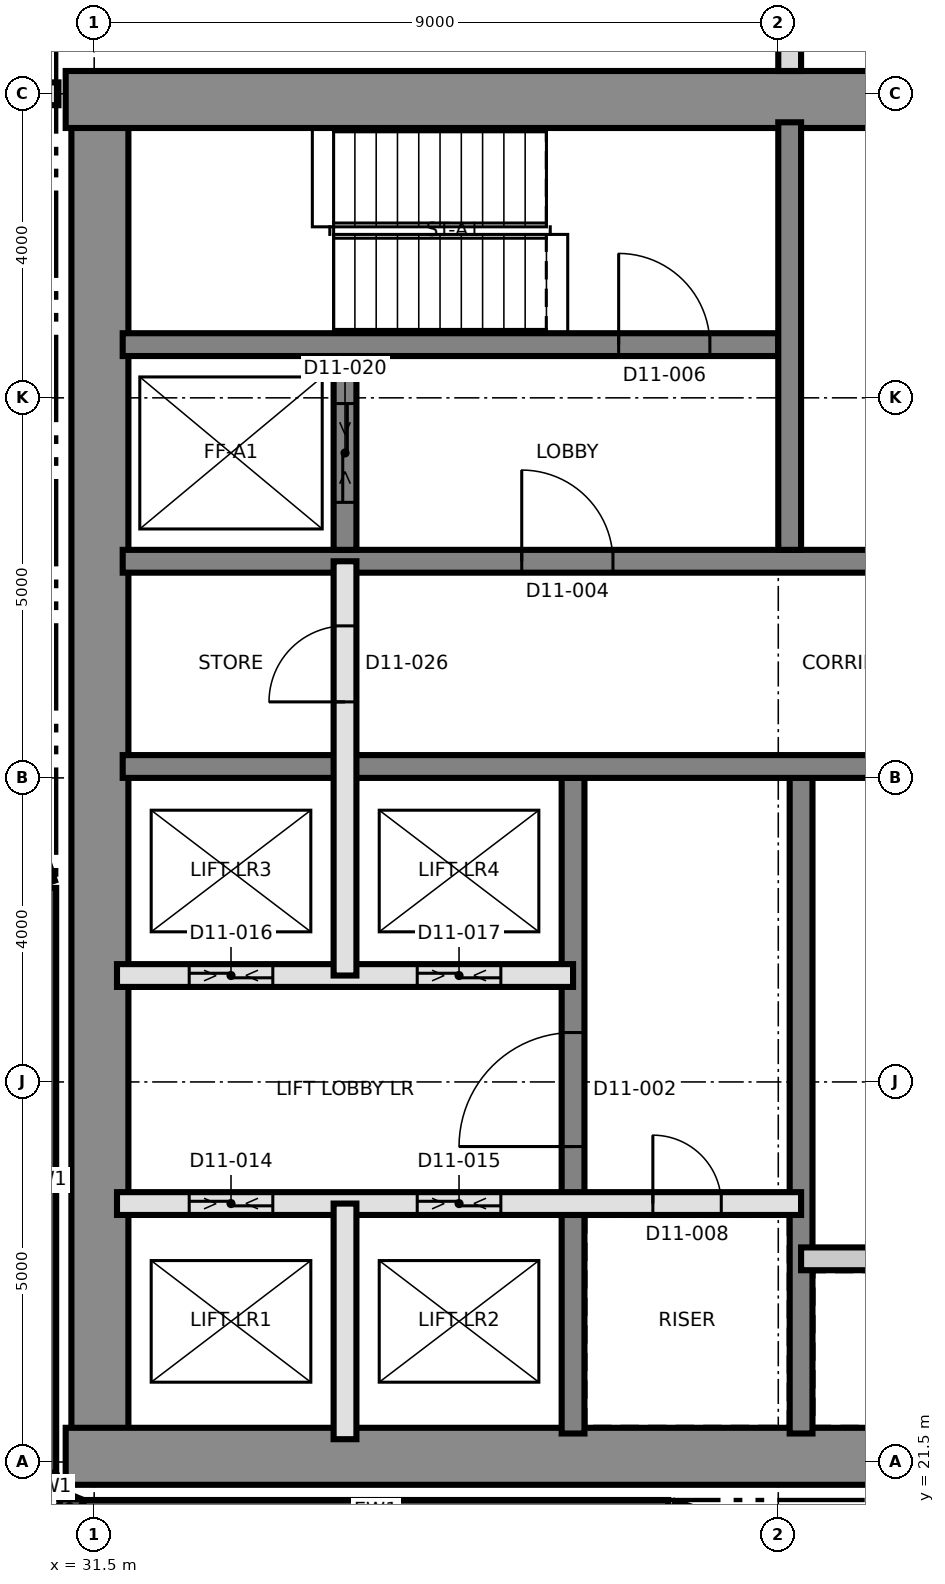
"""IFC4 building model, lengths in metres.
Left out: names, types, materials, properties, quantities, classifications, styles, units other than length and angle.
Written with IfcOpenShell. Run it as: python <this file> out.ifc"""

import sys

from ifc_helpers import new_model, si_unit, direction, frame, frame_2d, origin, place, context, subcontext, project, spatial, rectangle, extrude, element, fill, save


model = new_model("IFC4")
c1 = context("Model", 3, precision=1e-05, world=origin(), true_north=direction((0.0, 1.0)))
c2 = subcontext(c1, "Body", "Model", "MODEL_VIEW")
j1 = project(units=[si_unit("LENGTHUNIT", "METRE"), si_unit("PLANEANGLEUNIT", "RADIAN")], contexts=[c1])
p1 = place(None, origin())
s1 = spatial("IfcSite", under=j1, at=p1, CompositionType="ELEMENT")
p2 = place(p1, origin())
s2 = spatial("IfcBuilding", under=s1, at=p2, CompositionType="ELEMENT")
p3 = place(p2, frame((0.0, 0.0, 127.8)))
s3 = spatial("IfcBuildingStorey", under=s2, at=p3, CompositionType="ELEMENT", Elevation=127.8)
p4 = place(p3, frame((31.575, 21.875, 0.0), z_axis=(0.0, 0.0, 1.0), x_axis=(0.0, 1.0, 0.0)))
e1 = element("IfcWall", 1, at=p4, inside=s3, PredefinedType="SHEAR", context=c2, shape_type="SweptSolid", body=[
    extrude(rectangle(XDim=17.25, YDim=0.75, at=frame_2d((8.625, 0.0))), origin(), (0.0, 0.0, 1.0), 3.7),
])
p5 = place(p3, frame((31.125, 21.575, 0.0), z_axis=(0.0, 0.0, 1.0), x_axis=(1.0, 0.0, 0.0)))
e2 = element("IfcWall", 2, at=p5, inside=s3, PredefinedType="SHEAR", context=c2, shape_type="SweptSolid", body=[
    extrude(rectangle(XDim=27.0, YDim=0.75, at=frame_2d((13.5, 0.0))), origin(), (0.0, 0.0, 1.0), 3.7),
])
p6 = place(p3, frame((31.125, 39.425, 0.0), z_axis=(0.0, 0.0, 1.0), x_axis=(1.0, 0.0, 0.0)))
e3 = element("IfcWall", 3, at=p6, inside=s3, PredefinedType="SHEAR", context=c2, shape_type="SweptSolid", body=[
    extrude(rectangle(XDim=27.0, YDim=0.75, at=frame_2d((13.5, 0.0))), origin(), (0.0, 0.0, 1.0), 3.7),
])
p7 = place(p6, frame((10.575, 0.0, 0.0)))
e4 = element("IfcOpeningElement", 4, at=p7, cuts=e3, PredefinedType="OPENING", context=c2, shape_type="SweptSolid", body=[
    extrude(rectangle(XDim=1.2, YDim=2.1, at=frame_2d((0.6, 1.05))), frame((0.0, 0.385, 0.0), z_axis=(0.0, -1.0, 0.0), x_axis=(1.0, 0.0, 0.0)), (0.0, 0.0, 1.0), 0.77),
])
p8 = place(p3, frame((37.8, 21.875, 0.0), z_axis=(0.0, 0.0, 1.0), x_axis=(0.0, 1.0, 0.0)))
e5 = element("IfcWall", 5, at=p8, inside=s3, PredefinedType="SHEAR", context=c2, shape_type="SweptSolid", body=[
    extrude(rectangle(XDim=8.625, YDim=0.3, at=frame_2d((4.312, 0.0))), origin(), (0.0, 0.0, 1.0), 3.7),
])
p9 = place(p8, frame((3.775, 0.0, 0.0)))
e6 = element("IfcOpeningElement", 6, at=p9, cuts=e5, PredefinedType="OPENING", context=c2, shape_type="SweptSolid", body=[
    extrude(rectangle(XDim=1.5, YDim=2.1, at=frame_2d((0.75, 1.05))), frame((0.0, 0.16, 0.0), z_axis=(0.0, -1.0, 0.0), x_axis=(1.0, 0.0, 0.0)), (0.0, 0.0, 1.0), 0.32),
])
p10 = place(p3, frame((40.8, 21.875, 0.0), z_axis=(0.0, 0.0, 1.0), x_axis=(0.0, 1.0, 0.0)))
e7 = element("IfcWall", 7, at=p10, inside=s3, PredefinedType="SHEAR", context=c2, shape_type="SweptSolid", body=[
    extrude(rectangle(XDim=8.625, YDim=0.3, at=frame_2d((4.312, 0.0))), origin(), (0.0, 0.0, 1.0), 3.7),
])
p11 = place(p3, frame((31.875, 30.65, 0.0), z_axis=(0.0, 0.0, 1.0), x_axis=(1.0, 0.0, 0.0)))
e8 = element("IfcWall", 8, at=p11, inside=s3, PredefinedType="SHEAR", context=c2, shape_type="SweptSolid", body=[
    extrude(rectangle(XDim=26.25, YDim=0.3, at=frame_2d((13.125, 0.0))), origin(), (0.0, 0.0, 1.0), 3.7),
])
p12 = place(p11, frame((24.625, 0.0, 0.0)))
e9 = element("IfcOpeningElement", 9, at=p12, cuts=e8, PredefinedType="OPENING", context=c2, shape_type="SweptSolid", body=[
    extrude(rectangle(XDim=1.0, YDim=2.1, at=frame_2d((0.5, 1.05))), frame((0.0, 0.16, 0.0), z_axis=(0.0, -1.0, 0.0), x_axis=(1.0, 0.0, 0.0)), (0.0, 0.0, 1.0), 0.32),
])
p13 = place(p11, frame((11.425, 0.0, 0.0)))
e10 = element("IfcOpeningElement", 10, at=p13, cuts=e8, PredefinedType="OPENING", context=c2, shape_type="SweptSolid", body=[
    extrude(rectangle(XDim=1.0, YDim=2.1, at=frame_2d((0.5, 1.05))), frame((0.0, 0.16, 0.0), z_axis=(0.0, -1.0, 0.0), x_axis=(1.0, 0.0, 0.0)), (0.0, 0.0, 1.0), 0.32),
])
p14 = place(p3, frame((31.875, 33.35, 0.0), z_axis=(0.0, 0.0, 1.0), x_axis=(1.0, 0.0, 0.0)))
e11 = element("IfcWall", 11, at=p14, inside=s3, PredefinedType="SHEAR", context=c2, shape_type="SweptSolid", body=[
    extrude(rectangle(XDim=26.25, YDim=0.3, at=frame_2d((13.125, 0.0))), origin(), (0.0, 0.0, 1.0), 3.7),
])
p15 = place(p14, frame((13.2, 0.0, 0.0)))
e12 = element("IfcOpeningElement", 12, at=p15, cuts=e11, PredefinedType="OPENING", context=c2, shape_type="SweptSolid", body=[
    extrude(rectangle(XDim=1.4, YDim=2.1, at=frame_2d((0.7, 1.05))), frame((0.0, 0.16, 0.0), z_axis=(0.0, -1.0, 0.0), x_axis=(1.0, 0.0, 0.0)), (0.0, 0.0, 1.0), 0.32),
])
p16 = place(p14, frame((5.25, 0.0, 0.0)))
e13 = element("IfcOpeningElement", 13, at=p16, cuts=e11, PredefinedType="OPENING", context=c2, shape_type="SweptSolid", body=[
    extrude(rectangle(XDim=1.2, YDim=2.1, at=frame_2d((0.6, 1.05))), frame((0.0, 0.16, 0.0), z_axis=(0.0, -1.0, 0.0), x_axis=(1.0, 0.0, 0.0)), (0.0, 0.0, 1.0), 0.32),
])
p17 = place(p14, frame((19.8, 0.0, 0.0)))
e14 = element("IfcOpeningElement", 14, at=p17, cuts=e11, PredefinedType="OPENING", context=c2, shape_type="SweptSolid", body=[
    extrude(rectangle(XDim=1.2, YDim=2.1, at=frame_2d((0.6, 1.05))), frame((0.0, 0.16, 0.0), z_axis=(0.0, -1.0, 0.0), x_axis=(1.0, 0.0, 0.0)), (0.0, 0.0, 1.0), 0.32),
])
p18 = place(p3, frame((31.875, 36.2, 0.0), z_axis=(0.0, 0.0, 1.0), x_axis=(1.0, 0.0, 0.0)))
e15 = element("IfcWall", 15, at=p18, inside=s3, PredefinedType="SHEAR", context=c2, shape_type="SweptSolid", body=[
    extrude(rectangle(XDim=8.625, YDim=0.3, at=frame_2d((4.312, 0.0))), origin(), (0.0, 0.0, 1.0), 3.7),
])
p19 = place(p18, frame((6.525, 0.0, 0.0)))
e16 = element("IfcOpeningElement", 16, at=p19, cuts=e15, PredefinedType="OPENING", context=c2, shape_type="SweptSolid", body=[
    extrude(rectangle(XDim=1.2, YDim=2.1, at=frame_2d((0.6, 1.05))), frame((0.0, 0.16, 0.0), z_axis=(0.0, -1.0, 0.0), x_axis=(1.0, 0.0, 0.0)), (0.0, 0.0, 1.0), 0.32),
])
p20 = place(p3, frame((40.65, 33.5, 0.0), z_axis=(0.0, 0.0, 1.0), x_axis=(0.0, 1.0, 0.0)))
e17 = element("IfcWall", 17, at=p20, inside=s3, PredefinedType="SHEAR", context=c2, shape_type="SweptSolid", body=[
    extrude(rectangle(XDim=5.625, YDim=0.3, at=frame_2d((2.812, 0.0))), origin(), (0.0, 0.0, 1.0), 3.7),
])
p21 = place(p3, frame((34.8, 33.5, 0.0), z_axis=(0.0, 0.0, 1.0), x_axis=(0.0, 1.0, 0.0)))
e18 = element("IfcWall", 18, at=p21, inside=s3, PredefinedType="SHEAR", context=c2, shape_type="SweptSolid", body=[
    extrude(rectangle(XDim=2.55, YDim=0.3, at=frame_2d((1.275, 0.0))), origin(), (0.0, 0.0, 1.0), 3.7),
])
p22 = place(p21, frame((0.625, 0.0, 0.0)))
e19 = element("IfcOpeningElement", 19, at=p22, cuts=e18, PredefinedType="OPENING", context=c2, shape_type="SweptSolid", body=[
    extrude(rectangle(XDim=1.3, YDim=2.4, at=frame_2d((0.65, 1.2))), frame((0.0, 0.16, 0.0), z_axis=(0.0, -1.0, 0.0), x_axis=(1.0, 0.0, 0.0)), (0.0, 0.0, 1.0), 0.32),
])
p23 = place(p3, frame((30.85, 29.052, 0.0), z_axis=(0.0, 0.0, 1.0), x_axis=(0.0, -1.0, 0.0)))
e20 = element("IfcWall", 20, at=p23, inside=s3, PredefinedType="SOLIDWALL", context=c2, shape_type="SweptSolid", body=[
    extrude(rectangle(XDim=7.693, YDim=0.3, at=frame_2d((3.846, 0.0))), origin(), (0.0, 0.0, 1.0), 3.4),
])
for number, where, z_axis, x_axis in (
    (21, (30.861, 21.302, 0.0), (0.0, 0.0, 1.0), (0.383, -0.924, 0.0)),
    (22, (31.048, 20.967, 0.0), (0.0, 0.0, 1.0), (0.924, -0.383, 0.0)),
):
    element("IfcWall", number, at=place(p3, frame(where, z_axis=z_axis, x_axis=x_axis)), inside=s3, PredefinedType="SOLIDWALL", context=c2, shape_type="SweptSolid", body=[
        extrude(rectangle(XDim=0.275, YDim=0.3, at=frame_2d((0.138, 0.0))), origin(), (0.0, 0.0, 1.0), 3.4),
    ])
p24 = place(p3, frame((31.36, 20.85, 0.0), z_axis=(0.0, 0.0, 1.0), x_axis=(1.0, 0.0, 0.0)))
e23 = element("IfcWall", 23, at=p24, inside=s3, PredefinedType="SOLIDWALL", context=c2, shape_type="SweptSolid", body=[
    extrude(rectangle(XDim=7.693, YDim=0.3, at=frame_2d((3.846, 0.0))), origin(), (0.0, 0.0, 1.0), 3.4),
])
for number, where, z_axis, x_axis in (
    (24, (39.101, 20.842, 0.0), (0.0, 0.0, 1.0), (0.947, -0.321, 0.0)),
    (25, (30.418, 30.351, 0.0), (0.0, 0.0, 1.0), (0.321, -0.947, 0.0)),
):
    element("IfcWall", number, at=place(p3, frame(where, z_axis=z_axis, x_axis=x_axis)), inside=s3, PredefinedType="SOLIDWALL", context=c2, shape_type="SweptSolid", body=[
        extrude(rectangle(XDim=1.32, YDim=0.3, at=frame_2d((0.66, 0.0))), origin(), (0.0, 0.0, 1.0), 3.4),
    ])
p25 = place(p3, frame((40.8, 24.173, 0.0), z_axis=(0.0, 0.0, 1.0), x_axis=(1.0, 0.0, 0.0)))
e26 = element("IfcWall", 26, at=p25, inside=s3, PredefinedType="PARTITIONING", context=c2, shape_type="SweptSolid", body=[
    extrude(rectangle(XDim=6.0, YDim=0.3, at=frame_2d((3.0, 0.0))), origin(), (0.0, 0.0, 1.0), 3.4),
])
p26 = place(p25, frame((2.5, 0.0, 0.0)))
e27 = element("IfcOpeningElement", 27, at=p26, cuts=e26, PredefinedType="OPENING", context=c2, shape_type="SweptSolid", body=[
    extrude(rectangle(XDim=1.0, YDim=2.1, at=frame_2d((0.5, 1.05))), frame((0.0, 0.16, 0.0), z_axis=(0.0, -1.0, 0.0), x_axis=(1.0, 0.0, 0.0)), (0.0, 0.0, 1.0), 0.32),
])
p27 = place(p3, frame((31.8, 24.9, 0.0), z_axis=(0.0, 0.0, 1.0), x_axis=(1.0, 0.0, 0.0)))
e28 = element("IfcWall", 28, at=p27, inside=s3, PredefinedType="SOLIDWALL", context=c2, shape_type="SweptSolid", body=[
    extrude(rectangle(XDim=9.0, YDim=0.3, at=frame_2d((4.5, 0.0))), origin(), (0.0, 0.0, 1.0), 3.4),
])
p28 = place(p27, frame((7.05, 0.0, 0.0)))
e29 = element("IfcOpeningElement", 29, at=p28, cuts=e28, PredefinedType="OPENING", context=c2, shape_type="SweptSolid", body=[
    extrude(rectangle(XDim=0.9, YDim=2.1, at=frame_2d((0.45, 1.05))), frame((0.0, 0.16, 0.0), z_axis=(0.0, -1.0, 0.0), x_axis=(1.0, 0.0, 0.0)), (0.0, 0.0, 1.0), 0.32),
])
p29 = place(p27, frame((0.95, 0.0, 0.0)))
e30 = element("IfcOpeningElement", 30, at=p29, cuts=e28, PredefinedType="OPENING", context=c2, shape_type="SweptSolid", body=[
    extrude(rectangle(XDim=1.1, YDim=2.4, at=frame_2d((0.55, 1.2))), frame((0.0, 0.16, 0.0), z_axis=(0.0, -1.0, 0.0), x_axis=(1.0, 0.0, 0.0)), (0.0, 0.0, 1.0), 0.32),
])
p30 = place(p27, frame((3.95, 0.0, 0.0)))
e31 = element("IfcOpeningElement", 31, at=p30, cuts=e28, PredefinedType="OPENING", context=c2, shape_type="SweptSolid", body=[
    extrude(rectangle(XDim=1.1, YDim=2.4, at=frame_2d((0.55, 1.2))), frame((0.0, 0.16, 0.0), z_axis=(0.0, -1.0, 0.0), x_axis=(1.0, 0.0, 0.0)), (0.0, 0.0, 1.0), 0.32),
])
p31 = place(p3, frame((31.8, 27.9, 0.0), z_axis=(0.0, 0.0, 1.0), x_axis=(1.0, 0.0, 0.0)))
e32 = element("IfcWall", 32, at=p31, inside=s3, PredefinedType="SOLIDWALL", context=c2, shape_type="SweptSolid", body=[
    extrude(rectangle(XDim=6.0, YDim=0.3, at=frame_2d((3.0, 0.0))), origin(), (0.0, 0.0, 1.0), 3.4),
])
p32 = place(p31, frame((0.95, 0.0, 0.0)))
e33 = element("IfcOpeningElement", 33, at=p32, cuts=e32, PredefinedType="OPENING", context=c2, shape_type="SweptSolid", body=[
    extrude(rectangle(XDim=1.1, YDim=2.4, at=frame_2d((0.55, 1.2))), frame((0.0, 0.16, 0.0), z_axis=(0.0, -1.0, 0.0), x_axis=(1.0, 0.0, 0.0)), (0.0, 0.0, 1.0), 0.32),
])
p33 = place(p31, frame((3.95, 0.0, 0.0)))
e34 = element("IfcOpeningElement", 34, at=p33, cuts=e32, PredefinedType="OPENING", context=c2, shape_type="SweptSolid", body=[
    extrude(rectangle(XDim=1.1, YDim=2.4, at=frame_2d((0.55, 1.2))), frame((0.0, 0.16, 0.0), z_axis=(0.0, -1.0, 0.0), x_axis=(1.0, 0.0, 0.0)), (0.0, 0.0, 1.0), 0.32),
])
p34 = place(p3, frame((34.8, 21.8, 0.0), z_axis=(0.0, 0.0, 1.0), x_axis=(0.0, 1.0, 0.0)))
e35 = element("IfcWall", 35, at=p34, inside=s3, PredefinedType="SOLIDWALL", context=c2, shape_type="SweptSolid", body=[
    extrude(rectangle(XDim=3.1, YDim=0.3, at=frame_2d((1.55, 0.0))), origin(), (0.0, 0.0, 1.0), 3.4),
])
p35 = place(p3, frame((34.8, 27.9, 0.0), z_axis=(0.0, 0.0, 1.0), x_axis=(0.0, 1.0, 0.0)))
e36 = element("IfcWall", 36, at=p35, inside=s3, PredefinedType="SOLIDWALL", context=c2, shape_type="SweptSolid", body=[
    extrude(rectangle(XDim=5.45, YDim=0.3, at=frame_2d((2.725, 0.0))), origin(), (0.0, 0.0, 1.0), 3.4),
])
p36 = place(p35, frame((3.6, 0.0, 0.0)))
e37 = element("IfcOpeningElement", 37, at=p36, cuts=e36, PredefinedType="OPENING", context=c2, shape_type="SweptSolid", body=[
    extrude(rectangle(XDim=1.0, YDim=2.1, at=frame_2d((0.5, 1.05))), frame((0.0, 0.16, 0.0), z_axis=(0.0, -1.0, 0.0), x_axis=(1.0, 0.0, 0.0)), (0.0, 0.0, 1.0), 0.32),
])
p37 = place(p3, frame((30.135, 39.5, 0.0), z_axis=(0.0, 0.0, 1.0), x_axis=(1.0, 0.0, 0.0)))
e38 = element("IfcWall", 38, at=p37, inside=s3, PredefinedType="PARTITIONING", context=c2, shape_type="SweptSolid", body=[
    extrude(rectangle(XDim=0.895, YDim=0.3, at=frame_2d((0.448, 0.0))), origin(), (0.0, 0.0, 1.0), 3.4),
])
p38 = place(p3, frame((40.65, 39.8, 0.0), z_axis=(0.0, 0.0, 1.0), x_axis=(0.0, 1.0, 0.0)))
e39 = element("IfcWall", 39, at=p38, inside=s3, PredefinedType="PARTITIONING", context=c2, shape_type="SweptSolid", body=[
    extrude(rectangle(XDim=37.305, YDim=0.3, at=frame_2d((18.652, 0.0))), origin(), (0.0, 0.0, 1.0), 3.4),
])
p39 = place(p38, frame((0.85, 0.0, 0.0)))
e40 = element("IfcOpeningElement", 40, at=p39, cuts=e39, PredefinedType="OPENING", context=c2, shape_type="SweptSolid", body=[
    extrude(rectangle(XDim=1.0, YDim=2.1, at=frame_2d((0.5, 1.05))), frame((0.0, 0.16, 0.0), z_axis=(0.0, -1.0, 0.0), x_axis=(1.0, 0.0, 0.0)), (0.0, 0.0, 1.0), 0.32),
])
p40 = place(p38, frame((6.7, 0.0, 0.0)))
e41 = element("IfcOpeningElement", 41, at=p40, cuts=e39, PredefinedType="OPENING", context=c2, shape_type="SweptSolid", body=[
    extrude(rectangle(XDim=1.0, YDim=2.1, at=frame_2d((0.5, 1.05))), frame((0.0, 0.16, 0.0), z_axis=(0.0, -1.0, 0.0), x_axis=(1.0, 0.0, 0.0)), (0.0, 0.0, 1.0), 0.32),
])
p41 = place(p38, frame((14.35, 0.0, 0.0)))
e42 = element("IfcOpeningElement", 42, at=p41, cuts=e39, PredefinedType="OPENING", context=c2, shape_type="SweptSolid", body=[
    extrude(rectangle(XDim=1.0, YDim=2.4, at=frame_2d((0.5, 1.2))), frame((0.0, 0.16, 0.0), z_axis=(0.0, -1.0, 0.0), x_axis=(1.0, 0.0, 0.0)), (0.0, 0.0, 1.0), 0.32),
])
p42 = place(p38, frame((21.2, 0.0, 0.0)))
e43 = element("IfcOpeningElement", 43, at=p42, cuts=e39, PredefinedType="OPENING", context=c2, shape_type="SweptSolid", body=[
    extrude(rectangle(XDim=1.0, YDim=2.4, at=frame_2d((0.5, 1.2))), frame((0.0, 0.16, 0.0), z_axis=(0.0, -1.0, 0.0), x_axis=(1.0, 0.0, 0.0)), (0.0, 0.0, 1.0), 0.32),
])
p43 = place(p9, origin())
e44 = element("IfcDoor", 44, at=p43, inside=s3, OperationType="SINGLE_SWING_LEFT", PredefinedType="DOOR", context=c2, shape_type="SweptSolid", body=[
    extrude(rectangle(XDim=1.5, YDim=2.1, at=frame_2d((0.75, 1.05))), frame((0.0, 0.025, 0.0), z_axis=(0.0, -1.0, 0.0), x_axis=(1.0, 0.0, 0.0)), (0.0, 0.0, 1.0), 0.05),
])
fill(e6, e44)
p44 = place(p16, origin())
e45 = element("IfcDoor", 45, at=p44, inside=s3, OperationType="SINGLE_SWING_LEFT", PredefinedType="DOOR", context=c2, shape_type="SweptSolid", body=[
    extrude(rectangle(XDim=1.2, YDim=2.1, at=frame_2d((0.6, 1.05))), frame((0.0, 0.025, 0.0), z_axis=(0.0, -1.0, 0.0), x_axis=(1.0, 0.0, 0.0)), (0.0, 0.0, 1.0), 0.05),
])
fill(e13, e45)
p45 = place(p19, origin())
e46 = element("IfcDoor", 46, at=p45, inside=s3, OperationType="SINGLE_SWING_RIGHT", PredefinedType="DOOR", context=c2, shape_type="SweptSolid", body=[
    extrude(rectangle(XDim=1.2, YDim=2.1, at=frame_2d((0.6, 1.05))), frame((0.0, 0.025, 0.0), z_axis=(0.0, -1.0, 0.0), x_axis=(1.0, 0.0, 0.0)), (0.0, 0.0, 1.0), 0.05),
])
fill(e16, e46)
p46 = place(p28, origin())
e47 = element("IfcDoor", 47, at=p46, inside=s3, OperationType="SINGLE_SWING_LEFT", PredefinedType="DOOR", context=c2, shape_type="SweptSolid", body=[
    extrude(rectangle(XDim=0.9, YDim=2.1, at=frame_2d((0.45, 1.05))), frame((0.0, 0.025, 0.0), z_axis=(0.0, -1.0, 0.0), x_axis=(1.0, 0.0, 0.0)), (0.0, 0.0, 1.0), 0.05),
])
fill(e29, e47)
p47 = place(p29, origin())
e48 = element("IfcDoor", 48, at=p47, inside=s3, OperationType="SLIDING_TO_LEFT", PredefinedType="DOOR", context=c2, shape_type="SweptSolid", body=[
    extrude(rectangle(XDim=1.1, YDim=2.4, at=frame_2d((0.55, 1.2))), frame((0.0, 0.025, 0.0), z_axis=(0.0, -1.0, 0.0), x_axis=(1.0, 0.0, 0.0)), (0.0, 0.0, 1.0), 0.05),
])
fill(e30, e48)
p48 = place(p30, origin())
e49 = element("IfcDoor", 49, at=p48, inside=s3, OperationType="SLIDING_TO_LEFT", PredefinedType="DOOR", context=c2, shape_type="SweptSolid", body=[
    extrude(rectangle(XDim=1.1, YDim=2.4, at=frame_2d((0.55, 1.2))), frame((0.0, 0.025, 0.0), z_axis=(0.0, -1.0, 0.0), x_axis=(1.0, 0.0, 0.0)), (0.0, 0.0, 1.0), 0.05),
])
fill(e31, e49)
p49 = place(p32, origin())
e50 = element("IfcDoor", 50, at=p49, inside=s3, OperationType="SLIDING_TO_LEFT", PredefinedType="DOOR", context=c2, shape_type="SweptSolid", body=[
    extrude(rectangle(XDim=1.1, YDim=2.4, at=frame_2d((0.55, 1.2))), frame((0.0, 0.025, 0.0), z_axis=(0.0, -1.0, 0.0), x_axis=(1.0, 0.0, 0.0)), (0.0, 0.0, 1.0), 0.05),
])
fill(e33, e50)
p50 = place(p33, origin())
e51 = element("IfcDoor", 51, at=p50, inside=s3, OperationType="SLIDING_TO_LEFT", PredefinedType="DOOR", context=c2, shape_type="SweptSolid", body=[
    extrude(rectangle(XDim=1.1, YDim=2.4, at=frame_2d((0.55, 1.2))), frame((0.0, 0.025, 0.0), z_axis=(0.0, -1.0, 0.0), x_axis=(1.0, 0.0, 0.0)), (0.0, 0.0, 1.0), 0.05),
])
fill(e34, e51)
p51 = place(p22, origin())
e52 = element("IfcDoor", 52, at=p51, inside=s3, OperationType="SLIDING_TO_LEFT", PredefinedType="DOOR", context=c2, shape_type="SweptSolid", body=[
    extrude(rectangle(XDim=1.3, YDim=2.4, at=frame_2d((0.65, 1.2))), frame((0.0, 0.025, 0.0), z_axis=(0.0, -1.0, 0.0), x_axis=(1.0, 0.0, 0.0)), (0.0, 0.0, 1.0), 0.05),
])
fill(e19, e52)
p52 = place(p36, origin())
e53 = element("IfcDoor", 53, at=p52, inside=s3, OperationType="SINGLE_SWING_LEFT", PredefinedType="DOOR", context=c2, shape_type="SweptSolid", body=[
    extrude(rectangle(XDim=1.0, YDim=2.1, at=frame_2d((0.5, 1.05))), frame((0.0, 0.025, 0.0), z_axis=(0.0, -1.0, 0.0), x_axis=(1.0, 0.0, 0.0)), (0.0, 0.0, 1.0), 0.05),
])
fill(e37, e53)
save(model, sys.argv[1])
